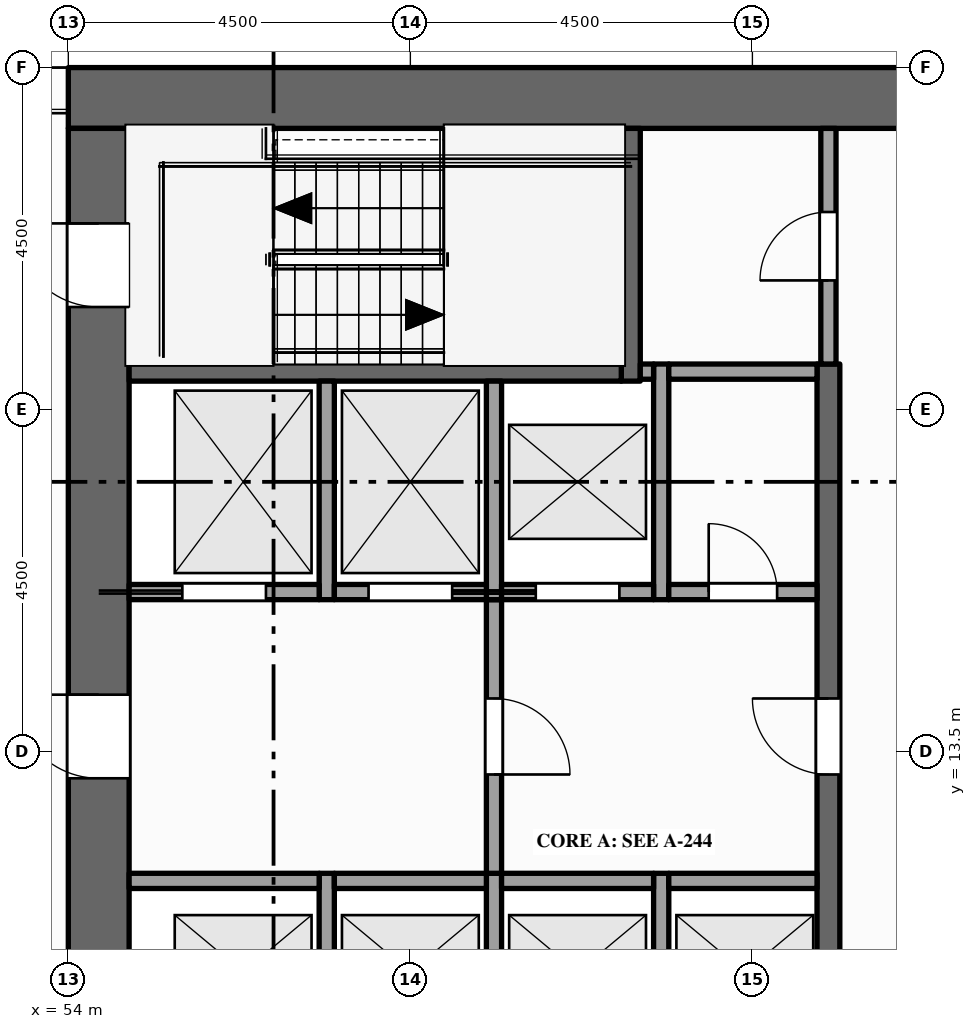
"""IFC4 building model, lengths in metres.
Left out: names, types, materials, properties, quantities, classifications, styles, units other than length and angle.
Written with IfcOpenShell. Run it as: python <this file> out.ifc"""

import sys

from ifc_helpers import new_model, si_unit, direction, frame, frame_2d, origin, place, context, subcontext, project, spatial, rectangle, extrude, element, fill, save


model = new_model("IFC4")
c1 = context("Model", 3, precision=1e-05, world=origin(), true_north=direction((0.0, 1.0)))
c2 = subcontext(c1, "Body", "Model", "MODEL_VIEW")
j1 = project(units=[si_unit("LENGTHUNIT", "METRE"), si_unit("PLANEANGLEUNIT", "RADIAN")], contexts=[c1])
p1 = place(None, origin())
s1 = spatial("IfcSite", under=j1, at=p1, CompositionType="ELEMENT")
p2 = place(p1, origin())
s2 = spatial("IfcBuilding", under=s1, at=p2, CompositionType="ELEMENT")
p3 = place(p2, frame((0.0, 0.0, 243.0)))
s3 = spatial("IfcBuildingStorey", under=s2, at=p3, CompositionType="ELEMENT", Elevation=243.0)
p4 = place(p3, frame((54.0, 22.1, -0.15), z_axis=(0.0, 0.0, 1.0), x_axis=(1.0, 0.0, 0.0)))
e1 = element("IfcWall", 1, at=p4, inside=s3, PredefinedType="SHEAR", context=c2, shape_type="SweptSolid", body=[
    extrude(rectangle(XDim=13.5, YDim=0.8, at=frame_2d((6.75, 0.0))), origin(), (0.0, 0.0, 1.0), 6.0),
])
p5 = place(p3, frame((54.4, 0.8, -0.15), z_axis=(0.0, 0.0, 1.0), x_axis=(0.0, 1.0, 0.0)))
e2 = element("IfcWall", 2, at=p5, inside=s3, PredefinedType="SHEAR", context=c2, shape_type="SweptSolid", body=[
    extrude(rectangle(XDim=20.9, YDim=0.8, at=frame_2d((10.45, 0.0))), origin(), (0.0, 0.0, 1.0), 6.0),
])
p6 = place(p5, frame((6.3, 0.0, 0.15)))
e3 = element("IfcOpeningElement", 3, at=p6, cuts=e2, PredefinedType="OPENING", context=c2, shape_type="SweptSolid", body=[
    extrude(rectangle(XDim=1.8, YDim=2.1, at=frame_2d((0.9, 1.05))), frame((0.0, 0.41, 0.0), z_axis=(0.0, -1.0, 0.0), x_axis=(1.0, 0.0, 0.0)), (0.0, 0.0, 1.0), 0.82),
])
p7 = place(p5, frame((12.35, 0.0, 0.15)))
e4 = element("IfcOpeningElement", 4, at=p7, cuts=e2, PredefinedType="OPENING", context=c2, shape_type="SweptSolid", body=[
    extrude(rectangle(XDim=1.1, YDim=2.1, at=frame_2d((0.55, 1.05))), frame((0.0, 0.41, 0.0), z_axis=(0.0, -1.0, 0.0), x_axis=(1.0, 0.0, 0.0)), (0.0, 0.0, 1.0), 0.82),
])
p8 = place(p5, frame((1.35, 0.0, 0.15)))
e5 = element("IfcOpeningElement", 5, at=p8, cuts=e2, PredefinedType="OPENING", context=c2, shape_type="SweptSolid", body=[
    extrude(rectangle(XDim=1.1, YDim=2.1, at=frame_2d((0.55, 1.05))), frame((0.0, 0.41, 0.0), z_axis=(0.0, -1.0, 0.0), x_axis=(1.0, 0.0, 0.0)), (0.0, 0.0, 1.0), 0.82),
])
p9 = place(p5, frame((18.55, 0.0, 0.15)))
e6 = element("IfcOpeningElement", 6, at=p9, cuts=e2, PredefinedType="OPENING", context=c2, shape_type="SweptSolid", body=[
    extrude(rectangle(XDim=1.1, YDim=2.1, at=frame_2d((0.55, 1.05))), frame((0.0, 0.41, 0.0), z_axis=(0.0, -1.0, 0.0), x_axis=(1.0, 0.0, 0.0)), (0.0, 0.0, 1.0), 0.82),
])
p10 = place(p3, frame((57.4, 9.3, 0.0), z_axis=(0.0, 0.0, 1.0), x_axis=(0.0, 1.0, 0.0)))
e7 = element("IfcWall", 7, at=p10, inside=s3, PredefinedType="SOLIDWALL", context=c2, shape_type="SweptSolid", body=[
    extrude(rectangle(XDim=2.6, YDim=0.2, at=frame_2d((1.3, 0.0))), origin(), (0.0, 0.0, 1.0), 5.85),
])
p11 = place(p3, frame((57.4, 15.5, 0.0), z_axis=(0.0, 0.0, 1.0), x_axis=(0.0, 1.0, 0.0)))
e8 = element("IfcWall", 8, at=p11, inside=s3, PredefinedType="SOLIDWALL", context=c2, shape_type="SweptSolid", body=[
    extrude(rectangle(XDim=2.875, YDim=0.2, at=frame_2d((1.438, 0.0))), origin(), (0.0, 0.0, 1.0), 5.85),
])
p12 = place(p3, frame((59.6, 9.3, 0.0), z_axis=(0.0, 0.0, 1.0), x_axis=(0.0, 1.0, 0.0)))
e9 = element("IfcWall", 9, at=p12, inside=s3, PredefinedType="SOLIDWALL", context=c2, shape_type="SweptSolid", body=[
    extrude(rectangle(XDim=2.6, YDim=0.2, at=frame_2d((1.3, 0.0))), origin(), (0.0, 0.0, 1.0), 5.85),
])
p13 = place(p3, frame((59.6, 11.9, 0.0), z_axis=(0.0, 0.0, 1.0), x_axis=(0.0, 1.0, 0.0)))
e10 = element("IfcWall", 10, at=p13, inside=s3, PredefinedType="PARTITIONING", context=c2, shape_type="SweptSolid", body=[
    extrude(rectangle(XDim=3.6, YDim=0.2, at=frame_2d((1.8, 0.0))), origin(), (0.0, 0.0, 1.0), 5.85),
])
p14 = place(p13, frame((1.3, 0.0, 0.0)))
e11 = element("IfcOpeningElement", 11, at=p14, cuts=e10, PredefinedType="OPENING", context=c2, shape_type="SweptSolid", body=[
    extrude(rectangle(XDim=1.0, YDim=2.1, at=frame_2d((0.5, 1.05))), frame((0.0, 0.11, 0.0), z_axis=(0.0, -1.0, 0.0), x_axis=(1.0, 0.0, 0.0)), (0.0, 0.0, 1.0), 0.22),
])
p15 = place(p3, frame((59.6, 15.5, 0.0), z_axis=(0.0, 0.0, 1.0), x_axis=(0.0, 1.0, 0.0)))
e12 = element("IfcWall", 12, at=p15, inside=s3, PredefinedType="SOLIDWALL", context=c2, shape_type="SweptSolid", body=[
    extrude(rectangle(XDim=2.875, YDim=0.2, at=frame_2d((1.438, 0.0))), origin(), (0.0, 0.0, 1.0), 5.85),
])
p16 = place(p3, frame((61.4, 18.375, 0.0), z_axis=(0.0, 0.0, 1.0), x_axis=(0.0, 1.0, 0.0)))
e13 = element("IfcWall", 13, at=p16, inside=s3, PredefinedType="SHEAR", context=c2, shape_type="SweptSolid", body=[
    extrude(rectangle(XDim=3.325, YDim=0.25, at=frame_2d((1.663, 0.0))), origin(), (0.0, 0.0, 1.0), 5.85),
])
p17 = place(p3, frame((61.8, 9.3, 0.0), z_axis=(0.0, 0.0, 1.0), x_axis=(0.0, 1.0, 0.0)))
e14 = element("IfcWall", 14, at=p17, inside=s3, PredefinedType="SOLIDWALL", context=c2, shape_type="SweptSolid", body=[
    extrude(rectangle(XDim=2.6, YDim=0.2, at=frame_2d((1.3, 0.0))), origin(), (0.0, 0.0, 1.0), 5.85),
])
p18 = place(p3, frame((61.8, 15.5, 0.0), z_axis=(0.0, 0.0, 1.0), x_axis=(0.0, 1.0, 0.0)))
e15 = element("IfcWall", 15, at=p18, inside=s3, PredefinedType="SOLIDWALL", context=c2, shape_type="SweptSolid", body=[
    extrude(rectangle(XDim=3.1, YDim=0.2, at=frame_2d((1.55, 0.0))), origin(), (0.0, 0.0, 1.0), 5.85),
])
p19 = place(p3, frame((64.0, 4.1, 0.0), z_axis=(0.0, 0.0, 1.0), x_axis=(0.0, 1.0, 0.0)))
e16 = element("IfcWall", 16, at=p19, inside=s3, PredefinedType="SHEAR", context=c2, shape_type="SweptSolid", body=[
    extrude(rectangle(XDim=14.5, YDim=0.3, at=frame_2d((7.25, 0.0))), origin(), (0.0, 0.0, 1.0), 5.85),
])
p20 = place(p19, frame((3.4, 0.0, 0.0)))
e17 = element("IfcOpeningElement", 17, at=p20, cuts=e16, PredefinedType="OPENING", context=c2, shape_type="SweptSolid", body=[
    extrude(rectangle(XDim=1.0, YDim=2.1, at=frame_2d((0.5, 1.05))), frame((0.0, 0.16, 0.0), z_axis=(0.0, -1.0, 0.0), x_axis=(1.0, 0.0, 0.0)), (0.0, 0.0, 1.0), 0.32),
])
p21 = place(p19, frame((9.1, 0.0, 0.0)))
e18 = element("IfcOpeningElement", 18, at=p21, cuts=e16, PredefinedType="OPENING", context=c2, shape_type="SweptSolid", body=[
    extrude(rectangle(XDim=1.0, YDim=2.1, at=frame_2d((0.5, 1.05))), frame((0.0, 0.16, 0.0), z_axis=(0.0, -1.0, 0.0), x_axis=(1.0, 0.0, 0.0)), (0.0, 0.0, 1.0), 0.32),
])
p22 = place(p3, frame((64.0, 18.6, 0.0), z_axis=(0.0, 0.0, 1.0), x_axis=(0.0, 1.0, 0.0)))
e19 = element("IfcWall", 19, at=p22, inside=s3, PredefinedType="PARTITIONING", context=c2, shape_type="SweptSolid", body=[
    extrude(rectangle(XDim=3.1, YDim=0.2, at=frame_2d((1.55, 0.0))), origin(), (0.0, 0.0, 1.0), 5.85),
])
p23 = place(p22, frame((1.1, 0.0, 0.0)))
e20 = element("IfcOpeningElement", 20, at=p23, cuts=e19, PredefinedType="OPENING", context=c2, shape_type="SweptSolid", body=[
    extrude(rectangle(XDim=0.9, YDim=2.1, at=frame_2d((0.45, 1.05))), frame((0.0, 0.11, 0.0), z_axis=(0.0, -1.0, 0.0), x_axis=(1.0, 0.0, 0.0)), (0.0, 0.0, 1.0), 0.22),
])
p24 = place(p3, frame((54.8, 11.8, 0.0), z_axis=(0.0, 0.0, 1.0), x_axis=(1.0, 0.0, 0.0)))
e21 = element("IfcWall", 21, at=p24, inside=s3, PredefinedType="SOLIDWALL", context=c2, shape_type="SweptSolid", body=[
    extrude(rectangle(XDim=2.5, YDim=0.2, at=frame_2d((1.25, 0.0))), origin(), (0.0, 0.0, 1.0), 5.85),
])
for number, where, z_axis, x_axis in (
    (22, (57.5, 11.8, 0.0), (0.0, 0.0, 1.0), (1.0, 0.0, 0.0)),
    (23, (59.7, 11.8, 0.0), (0.0, 0.0, 1.0), (1.0, 0.0, 0.0)),
):
    element("IfcWall", number, at=place(p3, frame(where, z_axis=z_axis, x_axis=x_axis)), inside=s3, PredefinedType="SOLIDWALL", context=c2, shape_type="SweptSolid", body=[
        extrude(rectangle(XDim=2.0, YDim=0.2, at=frame_2d((1.0, 0.0))), origin(), (0.0, 0.0, 1.0), 5.85),
    ])
p25 = place(p3, frame((61.9, 11.8, 0.0), z_axis=(0.0, 0.0, 1.0), x_axis=(1.0, 0.0, 0.0)))
e24 = element("IfcWall", 24, at=p25, inside=s3, PredefinedType="SOLIDWALL", context=c2, shape_type="SweptSolid", body=[
    extrude(rectangle(XDim=1.95, YDim=0.2, at=frame_2d((0.975, 0.0))), origin(), (0.0, 0.0, 1.0), 5.85),
])
p26 = place(p3, frame((54.8, 15.6, 0.0), z_axis=(0.0, 0.0, 1.0), x_axis=(1.0, 0.0, 0.0)))
e25 = element("IfcWall", 25, at=p26, inside=s3, PredefinedType="SOLIDWALL", context=c2, shape_type="SweptSolid", body=[
    extrude(rectangle(XDim=2.5, YDim=0.2, at=frame_2d((1.25, 0.0))), origin(), (0.0, 0.0, 1.0), 5.85),
])
p27 = place(p26, frame((0.7, 0.0, 0.012)))
e26 = element("IfcOpeningElement", 26, at=p27, cuts=e25, PredefinedType="OPENING", context=c2, shape_type="SweptSolid", body=[
    extrude(rectangle(XDim=1.1, YDim=2.1, at=frame_2d((0.55, 1.05))), frame((0.0, 0.11, 0.0), z_axis=(0.0, -1.0, 0.0), x_axis=(1.0, 0.0, 0.0)), (0.0, 0.0, 1.0), 0.22),
])
p28 = place(p3, frame((57.5, 15.6, 0.0), z_axis=(0.0, 0.0, 1.0), x_axis=(1.0, 0.0, 0.0)))
e27 = element("IfcWall", 27, at=p28, inside=s3, PredefinedType="SOLIDWALL", context=c2, shape_type="SweptSolid", body=[
    extrude(rectangle(XDim=2.0, YDim=0.2, at=frame_2d((1.0, 0.0))), origin(), (0.0, 0.0, 1.0), 5.85),
])
p29 = place(p28, frame((0.45, 0.0, 0.012)))
e28 = element("IfcOpeningElement", 28, at=p29, cuts=e27, PredefinedType="OPENING", context=c2, shape_type="SweptSolid", body=[
    extrude(rectangle(XDim=1.1, YDim=2.1, at=frame_2d((0.55, 1.05))), frame((0.0, 0.11, 0.0), z_axis=(0.0, -1.0, 0.0), x_axis=(1.0, 0.0, 0.0)), (0.0, 0.0, 1.0), 0.22),
])
p30 = place(p3, frame((59.7, 15.6, 0.0), z_axis=(0.0, 0.0, 1.0), x_axis=(1.0, 0.0, 0.0)))
e29 = element("IfcWall", 29, at=p30, inside=s3, PredefinedType="SOLIDWALL", context=c2, shape_type="SweptSolid", body=[
    extrude(rectangle(XDim=2.0, YDim=0.2, at=frame_2d((1.0, 0.0))), origin(), (0.0, 0.0, 1.0), 5.85),
])
p31 = place(p30, frame((0.45, 0.0, 0.012)))
e30 = element("IfcOpeningElement", 30, at=p31, cuts=e29, PredefinedType="OPENING", context=c2, shape_type="SweptSolid", body=[
    extrude(rectangle(XDim=1.1, YDim=2.1, at=frame_2d((0.55, 1.05))), frame((0.0, 0.11, 0.0), z_axis=(0.0, -1.0, 0.0), x_axis=(1.0, 0.0, 0.0)), (0.0, 0.0, 1.0), 0.22),
])
p32 = place(p3, frame((61.9, 15.6, 0.0), z_axis=(0.0, 0.0, 1.0), x_axis=(1.0, 0.0, 0.0)))
e31 = element("IfcWall", 31, at=p32, inside=s3, PredefinedType="PARTITIONING", context=c2, shape_type="SweptSolid", body=[
    extrude(rectangle(XDim=1.95, YDim=0.2, at=frame_2d((0.975, 0.0))), origin(), (0.0, 0.0, 1.0), 5.85),
])
p33 = place(p32, frame((0.525, 0.0, 0.0)))
e32 = element("IfcOpeningElement", 32, at=p33, cuts=e31, PredefinedType="OPENING", context=c2, shape_type="SweptSolid", body=[
    extrude(rectangle(XDim=0.9, YDim=2.1, at=frame_2d((0.45, 1.05))), frame((0.0, 0.11, 0.0), z_axis=(0.0, -1.0, 0.0), x_axis=(1.0, 0.0, 0.0)), (0.0, 0.0, 1.0), 0.22),
])
p34 = place(p3, frame((54.8, 18.5, 0.0), z_axis=(0.0, 0.0, 1.0), x_axis=(1.0, 0.0, 0.0)))
e33 = element("IfcWall", 33, at=p34, inside=s3, PredefinedType="SHEAR", context=c2, shape_type="SweptSolid", body=[
    extrude(rectangle(XDim=6.475, YDim=0.25, at=frame_2d((3.237, 0.0))), origin(), (0.0, 0.0, 1.0), 5.85),
])
p35 = place(p3, frame((61.525, 18.5, 0.0), z_axis=(0.0, 0.0, 1.0), x_axis=(1.0, 0.0, 0.0)))
e34 = element("IfcWall", 34, at=p35, inside=s3, PredefinedType="SOLIDWALL", context=c2, shape_type="SweptSolid", body=[
    extrude(rectangle(XDim=0.175, YDim=0.2, at=frame_2d((0.087, 0.0))), origin(), (0.0, 0.0, 1.0), 5.85),
])
p36 = place(p3, frame((61.9, 18.5, 0.0), z_axis=(0.0, 0.0, 1.0), x_axis=(1.0, 0.0, 0.0)))
e35 = element("IfcWall", 35, at=p36, inside=s3, PredefinedType="PARTITIONING", context=c2, shape_type="SweptSolid", body=[
    extrude(rectangle(XDim=1.95, YDim=0.2, at=frame_2d((0.975, 0.0))), origin(), (0.0, 0.0, 1.0), 5.85),
])
p37 = place(p27, origin())
e36 = element("IfcDoor", 36, at=p37, inside=s3, OperationType="SLIDING_TO_LEFT", PredefinedType="DOOR", context=c2, shape_type="SweptSolid", body=[
    extrude(rectangle(XDim=1.1, YDim=2.1, at=frame_2d((0.55, 1.05))), frame((0.0, 0.025, 0.0), z_axis=(0.0, -1.0, 0.0), x_axis=(1.0, 0.0, 0.0)), (0.0, 0.0, 1.0), 0.05),
])
fill(e26, e36)
p38 = place(p29, origin())
e37 = element("IfcDoor", 37, at=p38, inside=s3, OperationType="SLIDING_TO_RIGHT", PredefinedType="DOOR", context=c2, shape_type="SweptSolid", body=[
    extrude(rectangle(XDim=1.1, YDim=2.1, at=frame_2d((0.55, 1.05))), frame((0.0, 0.025, 0.0), z_axis=(0.0, -1.0, 0.0), x_axis=(1.0, 0.0, 0.0)), (0.0, 0.0, 1.0), 0.05),
])
fill(e28, e37)
p39 = place(p31, origin())
e38 = element("IfcDoor", 38, at=p39, inside=s3, OperationType="SLIDING_TO_LEFT", PredefinedType="DOOR", context=c2, shape_type="SweptSolid", body=[
    extrude(rectangle(XDim=1.1, YDim=2.1, at=frame_2d((0.55, 1.05))), frame((0.0, 0.025, 0.0), z_axis=(0.0, -1.0, 0.0), x_axis=(1.0, 0.0, 0.0)), (0.0, 0.0, 1.0), 0.05),
])
fill(e30, e38)
p40 = place(p7, origin())
e39 = element("IfcDoor", 39, at=p40, inside=s3, OperationType="SINGLE_SWING_RIGHT", PredefinedType="DOOR", context=c2, shape_type="SweptSolid", body=[
    extrude(rectangle(XDim=1.1, YDim=2.1, at=frame_2d((0.55, 1.05))), frame((0.0, 0.025, 0.0), z_axis=(0.0, -1.0, 0.0), x_axis=(1.0, 0.0, 0.0)), (0.0, 0.0, 1.0), 0.05),
])
fill(e4, e39)
p41 = place(p14, origin())
e40 = element("IfcDoor", 40, at=p41, inside=s3, OperationType="SINGLE_SWING_LEFT", PredefinedType="DOOR", context=c2, shape_type="SweptSolid", body=[
    extrude(rectangle(XDim=1.0, YDim=2.1, at=frame_2d((0.5, 1.05))), frame((0.0, 0.025, 0.0), z_axis=(0.0, -1.0, 0.0), x_axis=(1.0, 0.0, 0.0)), (0.0, 0.0, 1.0), 0.05),
])
fill(e11, e40)
p42 = place(p21, origin())
e41 = element("IfcDoor", 41, at=p42, inside=s3, OperationType="SINGLE_SWING_RIGHT", PredefinedType="DOOR", context=c2, shape_type="SweptSolid", body=[
    extrude(rectangle(XDim=1.0, YDim=2.1, at=frame_2d((0.5, 1.05))), frame((0.0, 0.025, 0.0), z_axis=(0.0, -1.0, 0.0), x_axis=(1.0, 0.0, 0.0)), (0.0, 0.0, 1.0), 0.05),
])
fill(e18, e41)
p43 = place(p9, origin())
e42 = element("IfcDoor", 42, at=p43, inside=s3, OperationType="SINGLE_SWING_RIGHT", PredefinedType="DOOR", context=c2, shape_type="SweptSolid", body=[
    extrude(rectangle(XDim=1.1, YDim=2.1, at=frame_2d((0.55, 1.05))), frame((0.0, 0.025, 0.0), z_axis=(0.0, -1.0, 0.0), x_axis=(1.0, 0.0, 0.0)), (0.0, 0.0, 1.0), 0.05),
])
fill(e6, e42)
p44 = place(p23, origin())
e43 = element("IfcDoor", 43, at=p44, inside=s3, OperationType="SINGLE_SWING_LEFT", PredefinedType="DOOR", context=c2, shape_type="SweptSolid", body=[
    extrude(rectangle(XDim=0.9, YDim=2.1, at=frame_2d((0.45, 1.05))), frame((0.0, 0.025, 0.0), z_axis=(0.0, -1.0, 0.0), x_axis=(1.0, 0.0, 0.0)), (0.0, 0.0, 1.0), 0.05),
])
fill(e20, e43)
p45 = place(p33, origin())
e44 = element("IfcDoor", 44, at=p45, inside=s3, OperationType="SINGLE_SWING_LEFT", PredefinedType="DOOR", context=c2, shape_type="SweptSolid", body=[
    extrude(rectangle(XDim=0.9, YDim=2.1, at=frame_2d((0.45, 1.05))), frame((0.0, 0.025, 0.0), z_axis=(0.0, -1.0, 0.0), x_axis=(1.0, 0.0, 0.0)), (0.0, 0.0, 1.0), 0.05),
])
fill(e32, e44)
save(model, sys.argv[1])
